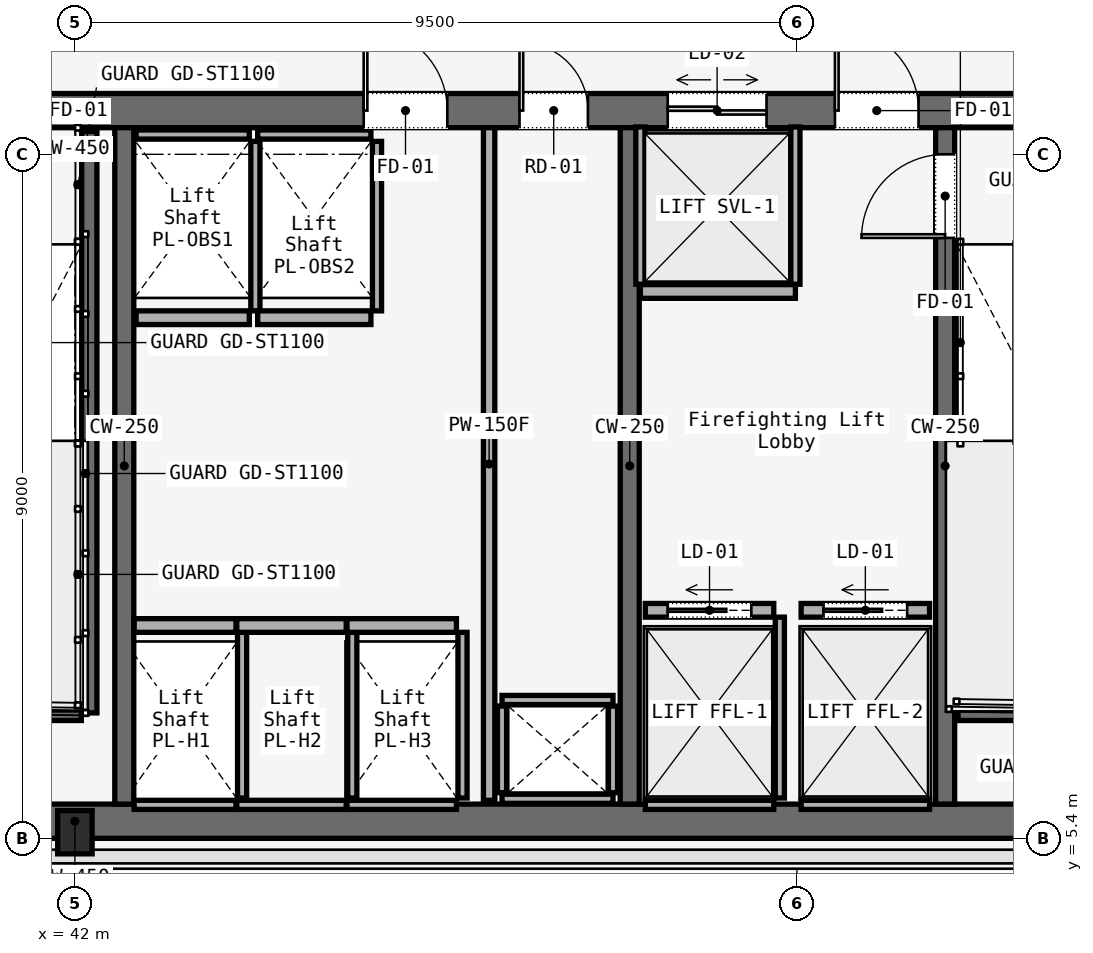
"""IFC4 building model, lengths in metres.
Left out: names, types, materials, properties, quantities, classifications, styles, units other than length and angle.
Written with IfcOpenShell. Run it as: python <this file> out.ifc"""

import sys

from ifc_helpers import new_model, si_unit, direction, frame, frame_2d, origin, origin_2d, place, context, subcontext, project, spatial, rectangle, i_section, extrude, element, fill, save


model = new_model("IFC4")
c1 = context("Model", 3, precision=1e-05, world=origin(), true_north=direction((0.0, 1.0)))
c2 = subcontext(c1, "Body", "Model", "MODEL_VIEW")
j1 = project(units=[si_unit("LENGTHUNIT", "METRE"), si_unit("PLANEANGLEUNIT", "RADIAN")], contexts=[c1])
p1 = place(None, origin())
s1 = spatial("IfcSite", under=j1, at=p1, CompositionType="ELEMENT")
p2 = place(p1, origin())
s2 = spatial("IfcBuilding", under=s1, at=p2, CompositionType="ELEMENT")
p3 = place(p2, frame((0.0, 0.0, 62.6)))
s3 = spatial("IfcBuildingStorey", under=s2, at=p3, CompositionType="ELEMENT", Elevation=62.6)
p4 = place(p3, frame((26.45, 14.975, 0.0), z_axis=(0.0, 0.0, 1.0), x_axis=(1.0, 0.0, 0.0)))
e1 = element("IfcWall", 1, at=p4, inside=s3, PredefinedType="SOLIDWALL", context=c2, shape_type="SweptSolid", body=[
    extrude(rectangle(XDim=31.1, YDim=0.45, at=frame_2d((15.55, 0.0))), origin(), (0.0, 0.0, 1.0), 3.58),
])
p5 = place(p4, frame((1.65, 0.0, 0.0)))
e2 = element("IfcOpeningElement", 2, at=p5, cuts=e1, PredefinedType="OPENING", context=c2, shape_type="SweptSolid", body=[
    extrude(rectangle(XDim=1.1, YDim=2.2, at=frame_2d((0.55, 1.1))), frame((0.0, 0.225, 0.0), z_axis=(0.0, -1.0, 0.0), x_axis=(1.0, 0.0, 0.0)), (0.0, 0.0, 1.0), 0.45),
])
p6 = place(p4, frame((13.65, 0.0, 0.0)))
e3 = element("IfcOpeningElement", 3, at=p6, cuts=e1, PredefinedType="OPENING", context=c2, shape_type="SweptSolid", body=[
    extrude(rectangle(XDim=1.1, YDim=2.2, at=frame_2d((0.55, 1.1))), frame((0.0, 0.225, 0.0), z_axis=(0.0, -1.0, 0.0), x_axis=(1.0, 0.0, 0.0)), (0.0, 0.0, 1.0), 0.45),
])
p7 = place(p4, frame((25.55, 0.0, 0.0)))
e4 = element("IfcOpeningElement", 4, at=p7, cuts=e1, PredefinedType="OPENING", context=c2, shape_type="SweptSolid", body=[
    extrude(rectangle(XDim=1.1, YDim=2.2, at=frame_2d((0.55, 1.1))), frame((0.0, 0.225, 0.0), z_axis=(0.0, -1.0, 0.0), x_axis=(1.0, 0.0, 0.0)), (0.0, 0.0, 1.0), 0.45),
])
p8 = place(p4, frame((10.7, 0.0, 0.0)))
e5 = element("IfcOpeningElement", 5, at=p8, cuts=e1, PredefinedType="OPENING", context=c2, shape_type="SweptSolid", body=[
    extrude(rectangle(XDim=1.4, YDim=2.2, at=frame_2d((0.7, 1.1))), frame((0.0, 0.225, 0.0), z_axis=(0.0, -1.0, 0.0), x_axis=(1.0, 0.0, 0.0)), (0.0, 0.0, 1.0), 0.45),
])
p9 = place(p4, frame((19.35, 0.0, 0.0)))
e6 = element("IfcOpeningElement", 6, at=p9, cuts=e1, PredefinedType="OPENING", context=c2, shape_type="SweptSolid", body=[
    extrude(rectangle(XDim=1.1, YDim=2.2, at=frame_2d((0.55, 1.1))), frame((0.0, 0.225, 0.0), z_axis=(0.0, -1.0, 0.0), x_axis=(1.0, 0.0, 0.0)), (0.0, 0.0, 1.0), 0.45),
])
p10 = place(p4, frame((21.4, 0.0, 0.0)))
e7 = element("IfcOpeningElement", 7, at=p10, cuts=e1, PredefinedType="OPENING", context=c2, shape_type="SweptSolid", body=[
    extrude(rectangle(XDim=0.9, YDim=2.1, at=frame_2d((0.45, 1.05))), frame((0.0, 0.225, 0.0), z_axis=(0.0, -1.0, 0.0), x_axis=(1.0, 0.0, 0.0)), (0.0, 0.0, 1.0), 0.45),
])
p11 = place(p4, frame((23.35, 0.0, 0.0)))
e8 = element("IfcOpeningElement", 8, at=p11, cuts=e1, PredefinedType="OPENING", context=c2, shape_type="SweptSolid", body=[
    extrude(rectangle(XDim=1.3, YDim=2.3, at=frame_2d((0.65, 1.15))), frame((0.0, 0.225, 0.0), z_axis=(0.0, -1.0, 0.0), x_axis=(1.0, 0.0, 0.0)), (0.0, 0.0, 1.0), 0.45),
])
p12 = place(p3, frame((26.45, 5.625, 0.0), z_axis=(0.0, 0.0, 1.0), x_axis=(1.0, 0.0, 0.0)))
e9 = element("IfcWall", 9, at=p12, inside=s3, PredefinedType="SOLIDWALL", context=c2, shape_type="SweptSolid", body=[
    extrude(rectangle(XDim=31.1, YDim=0.45, at=frame_2d((15.55, 0.0))), origin(), (0.0, 0.0, 1.0), 3.58),
])
for number, where, z_axis, x_axis in (
    (10, (42.65, 5.85, 0.0), (0.0, 0.0, 1.0), (0.0, 1.0, 0.0)),
    (11, (49.3, 5.85, 0.0), (0.0, 0.0, 1.0), (0.0, 1.0, 0.0)),
):
    element("IfcWall", number, at=place(p3, frame(where, z_axis=z_axis, x_axis=x_axis)), inside=s3, PredefinedType="SOLIDWALL", context=c2, shape_type="SweptSolid", body=[
        extrude(rectangle(XDim=8.9, YDim=0.25, at=frame_2d((4.45, 0.0))), origin(), (0.0, 0.0, 1.0), 3.58),
    ])
p13 = place(p3, frame((53.45, 5.85, 0.0), z_axis=(0.0, 0.0, 1.0), x_axis=(0.0, 1.0, 0.0)))
e12 = element("IfcWall", 12, at=p13, inside=s3, PredefinedType="SOLIDWALL", context=c2, shape_type="SweptSolid", body=[
    extrude(rectangle(XDim=8.9, YDim=0.25, at=frame_2d((4.45, 0.0))), origin(), (0.0, 0.0, 1.0), 3.58),
])
p14 = place(p13, frame((7.45, 0.0, 0.0)))
e13 = element("IfcOpeningElement", 13, at=p14, cuts=e12, PredefinedType="OPENING", context=c2, shape_type="SweptSolid", body=[
    extrude(rectangle(XDim=1.1, YDim=2.2, at=frame_2d((0.55, 1.1))), frame((0.0, 0.125, 0.0), z_axis=(0.0, -1.0, 0.0), x_axis=(1.0, 0.0, 0.0)), (0.0, 0.0, 1.0), 0.25),
])
p15 = place(p3, frame((42.0, 5.48, 0.0), z_axis=(0.0, 0.0, 1.0), x_axis=(1.0, 0.0, 0.0)))
e14 = element("IfcColumn", 14, at=p15, inside=s3, PredefinedType="COLUMN", context=c2, shape_type="SweptSolid", body=[
    extrude(i_section(OverallWidth=0.454, OverallDepth=0.569, WebThickness=0.078, FlangeThickness=0.08, FilletRadius=0.015, at=origin_2d()), origin(), (0.0, 0.0, 1.0), 3.58),
])
p16 = place(p3, frame((42.19, 14.7, 0.0), z_axis=(0.0, 0.0, 1.0), x_axis=(0.0, -1.0, 0.0)))
e15 = element("IfcWall", 15, at=p16, inside=s3, PredefinedType="SOLIDWALL", context=c2, shape_type="SweptSolid", body=[
    extrude(rectangle(XDim=7.65, YDim=0.2, at=frame_2d((3.825, 0.0))), origin(), (0.0, 0.0, 1.0), 3.8),
])
for number, where, z_axis, x_axis in (
    (16, (38.97, 7.05, 0.0), (0.0, 0.0, 1.0), (1.0, 0.0, 0.0)),
    (17, (53.62, 7.05, 0.0), (0.0, 0.0, 1.0), (1.0, 0.0, 0.0)),
):
    element("IfcWall", number, at=place(p3, frame(where, z_axis=z_axis, x_axis=x_axis)), inside=s3, PredefinedType="SOLIDWALL", context=c2, shape_type="SweptSolid", body=[
        extrude(rectangle(XDim=3.115, YDim=0.2, at=frame_2d((1.558, 0.0))), origin(), (0.0, 0.0, 1.0), 3.8),
    ])
for number, where, z_axis, x_axis in (
    (18, (47.62, 5.92, 0.0), (0.0, 0.0, 1.0), (1.0, 0.0, 0.0)),
    (19, (47.62, 7.22, 0.0), (0.0, 0.0, 1.0), (1.0, 0.0, 0.0)),
):
    element("IfcWall", number, at=place(p3, frame(where, z_axis=z_axis, x_axis=x_axis)), inside=s3, PredefinedType="SOLIDWALL", context=c2, shape_type="SweptSolid", body=[
        extrude(rectangle(XDim=1.46, YDim=0.12, at=frame_2d((0.73, 0.0))), origin(), (0.0, 0.0, 1.0), 2.933),
    ])
for number, where, z_axis, x_axis in (
    (20, (47.62, 6.0, 0.0), (0.0, 0.0, 1.0), (0.0, 1.0, 0.0)),
    (21, (49.08, 6.0, 0.0), (0.0, 0.0, 1.0), (0.0, 1.0, 0.0)),
):
    element("IfcWall", number, at=place(p3, frame(where, z_axis=z_axis, x_axis=x_axis)), inside=s3, PredefinedType="SOLIDWALL", context=c2, shape_type="SweptSolid", body=[
        extrude(rectangle(XDim=1.14, YDim=0.12, at=frame_2d((0.57, 0.0))), origin(), (0.0, 0.0, 1.0), 2.933),
    ])
p17 = place(p3, frame((47.45, 5.9, 0.0), z_axis=(0.0, 0.0, 1.0), x_axis=(0.0, 1.0, 0.0)))
e22 = element("IfcWall", 22, at=p17, inside=s3, PredefinedType="PARTITIONING", context=c2, shape_type="SweptSolid", body=[
    extrude(rectangle(XDim=8.85, YDim=0.15, at=frame_2d((4.425, 0.0))), origin(), (0.0, 0.0, 1.0), 2.933),
])
p18 = place(p3, frame((42.78, 8.2, 0.0), z_axis=(0.0, 0.0, 1.0), x_axis=(1.0, 0.0, 0.0)))
e23 = element("IfcWall", 23, at=p18, inside=s3, PredefinedType="SOLIDWALL", context=c2, shape_type="SweptSolid", body=[
    extrude(rectangle(XDim=1.34, YDim=0.18, at=frame_2d((0.67, 0.0))), origin(), (0.0, 0.0, 1.0), 2.933),
])
p19 = place(p3, frame((42.78, 5.84, 0.0), z_axis=(0.0, 0.0, 1.0), x_axis=(1.0, 0.0, 0.0)))
e24 = element("IfcWall", 24, at=p19, inside=s3, PredefinedType="SOLIDWALL", context=c2, shape_type="SweptSolid", body=[
    extrude(rectangle(XDim=1.34, YDim=0.12, at=frame_2d((0.67, 0.0))), origin(), (0.0, 0.0, 1.0), 2.933),
])
p20 = place(p3, frame((44.2, 5.93, 0.0), z_axis=(0.0, 0.0, 1.0), x_axis=(0.0, 1.0, 0.0)))
e25 = element("IfcWall", 25, at=p20, inside=s3, PredefinedType="SOLIDWALL", context=c2, shape_type="SweptSolid", body=[
    extrude(rectangle(XDim=2.18, YDim=0.12, at=frame_2d((1.09, 0.0))), origin(), (0.0, 0.0, 1.0), 2.933),
])
p21 = place(p3, frame((44.13, 8.2, 0.0), z_axis=(0.0, 0.0, 1.0), x_axis=(1.0, 0.0, 0.0)))
e26 = element("IfcWall", 26, at=p21, inside=s3, PredefinedType="SOLIDWALL", context=c2, shape_type="SweptSolid", body=[
    extrude(rectangle(XDim=1.44, YDim=0.18, at=frame_2d((0.72, 0.0))), origin(), (0.0, 0.0, 1.0), 2.933),
])
p22 = place(p3, frame((44.13, 5.84, 0.0), z_axis=(0.0, 0.0, 1.0), x_axis=(1.0, 0.0, 0.0)))
e27 = element("IfcWall", 27, at=p22, inside=s3, PredefinedType="SOLIDWALL", context=c2, shape_type="SweptSolid", body=[
    extrude(rectangle(XDim=1.44, YDim=0.12, at=frame_2d((0.72, 0.0))), origin(), (0.0, 0.0, 1.0), 2.933),
])
p23 = place(p3, frame((45.65, 5.93, 0.0), z_axis=(0.0, 0.0, 1.0), x_axis=(0.0, 1.0, 0.0)))
e28 = element("IfcWall", 28, at=p23, inside=s3, PredefinedType="SOLIDWALL", context=c2, shape_type="SweptSolid", body=[
    extrude(rectangle(XDim=2.18, YDim=0.12, at=frame_2d((1.09, 0.0))), origin(), (0.0, 0.0, 1.0), 2.933),
])
p24 = place(p3, frame((45.58, 8.2, 0.0), z_axis=(0.0, 0.0, 1.0), x_axis=(1.0, 0.0, 0.0)))
e29 = element("IfcWall", 29, at=p24, inside=s3, PredefinedType="SOLIDWALL", context=c2, shape_type="SweptSolid", body=[
    extrude(rectangle(XDim=1.44, YDim=0.18, at=frame_2d((0.72, 0.0))), origin(), (0.0, 0.0, 1.0), 2.933),
])
p25 = place(p3, frame((45.58, 5.84, 0.0), z_axis=(0.0, 0.0, 1.0), x_axis=(1.0, 0.0, 0.0)))
e30 = element("IfcWall", 30, at=p25, inside=s3, PredefinedType="SOLIDWALL", context=c2, shape_type="SweptSolid", body=[
    extrude(rectangle(XDim=1.44, YDim=0.12, at=frame_2d((0.72, 0.0))), origin(), (0.0, 0.0, 1.0), 2.933),
])
p26 = place(p3, frame((47.1, 5.93, 0.0), z_axis=(0.0, 0.0, 1.0), x_axis=(0.0, 1.0, 0.0)))
e31 = element("IfcWall", 31, at=p26, inside=s3, PredefinedType="SOLIDWALL", context=c2, shape_type="SweptSolid", body=[
    extrude(rectangle(XDim=2.18, YDim=0.12, at=frame_2d((1.09, 0.0))), origin(), (0.0, 0.0, 1.0), 2.933),
])
p27 = place(p3, frame((42.805, 12.25, 0.0), z_axis=(0.0, 0.0, 1.0), x_axis=(1.0, 0.0, 0.0)))
e32 = element("IfcWall", 32, at=p27, inside=s3, PredefinedType="SOLIDWALL", context=c2, shape_type="SweptSolid", body=[
    extrude(rectangle(XDim=1.49, YDim=0.18, at=frame_2d((0.745, 0.0))), origin(), (0.0, 0.0, 1.0), 2.933),
])
p28 = place(p3, frame((42.805, 14.66, 0.0), z_axis=(0.0, 0.0, 1.0), x_axis=(1.0, 0.0, 0.0)))
e33 = element("IfcWall", 33, at=p28, inside=s3, PredefinedType="SOLIDWALL", context=c2, shape_type="SweptSolid", body=[
    extrude(rectangle(XDim=1.49, YDim=0.12, at=frame_2d((0.745, 0.0))), origin(), (0.0, 0.0, 1.0), 2.933),
])
p29 = place(p3, frame((44.375, 12.34, 0.0), z_axis=(0.0, 0.0, 1.0), x_axis=(0.0, 1.0, 0.0)))
e34 = element("IfcWall", 34, at=p29, inside=s3, PredefinedType="SOLIDWALL", context=c2, shape_type="SweptSolid", body=[
    extrude(rectangle(XDim=2.23, YDim=0.12, at=frame_2d((1.115, 0.0))), origin(), (0.0, 0.0, 1.0), 2.933),
])
p30 = place(p3, frame((44.405, 12.25, 0.0), z_axis=(0.0, 0.0, 1.0), x_axis=(1.0, 0.0, 0.0)))
e35 = element("IfcWall", 35, at=p30, inside=s3, PredefinedType="SOLIDWALL", context=c2, shape_type="SweptSolid", body=[
    extrude(rectangle(XDim=1.49, YDim=0.18, at=frame_2d((0.745, 0.0))), origin(), (0.0, 0.0, 1.0), 2.933),
])
p31 = place(p3, frame((44.405, 14.66, 0.0), z_axis=(0.0, 0.0, 1.0), x_axis=(1.0, 0.0, 0.0)))
e36 = element("IfcWall", 36, at=p31, inside=s3, PredefinedType="SOLIDWALL", context=c2, shape_type="SweptSolid", body=[
    extrude(rectangle(XDim=1.49, YDim=0.12, at=frame_2d((0.745, 0.0))), origin(), (0.0, 0.0, 1.0), 2.933),
])
p32 = place(p3, frame((45.975, 12.34, 0.0), z_axis=(0.0, 0.0, 1.0), x_axis=(0.0, 1.0, 0.0)))
e37 = element("IfcWall", 37, at=p32, inside=s3, PredefinedType="SOLIDWALL", context=c2, shape_type="SweptSolid", body=[
    extrude(rectangle(XDim=2.23, YDim=0.12, at=frame_2d((1.115, 0.0))), origin(), (0.0, 0.0, 1.0), 2.933),
])
p33 = place(p3, frame((49.505, 8.4, 0.0), z_axis=(0.0, 0.0, 1.0), x_axis=(1.0, 0.0, 0.0)))
e38 = element("IfcWall", 38, at=p33, inside=s3, PredefinedType="SOLIDWALL", context=c2, shape_type="SweptSolid", body=[
    extrude(rectangle(XDim=1.69, YDim=0.18, at=frame_2d((0.845, 0.0))), origin(), (0.0, 0.0, 1.0), 2.933),
])
p34 = place(p33, frame((0.295, 0.0, 0.0)))
e39 = element("IfcOpeningElement", 39, at=p34, cuts=e38, PredefinedType="OPENING", context=c2, shape_type="SweptSolid", body=[
    extrude(rectangle(XDim=1.1, YDim=2.2, at=frame_2d((0.55, 1.1))), frame((0.0, 0.09, 0.0), z_axis=(0.0, -1.0, 0.0), x_axis=(1.0, 0.0, 0.0)), (0.0, 0.0, 1.0), 0.18),
])
p35 = place(p3, frame((49.505, 5.84, 0.0), z_axis=(0.0, 0.0, 1.0), x_axis=(1.0, 0.0, 0.0)))
e40 = element("IfcWall", 40, at=p35, inside=s3, PredefinedType="SOLIDWALL", context=c2, shape_type="SweptSolid", body=[
    extrude(rectangle(XDim=1.69, YDim=0.12, at=frame_2d((0.845, 0.0))), origin(), (0.0, 0.0, 1.0), 2.933),
])
p36 = place(p3, frame((51.275, 5.93, 0.0), z_axis=(0.0, 0.0, 1.0), x_axis=(0.0, 1.0, 0.0)))
e41 = element("IfcWall", 41, at=p36, inside=s3, PredefinedType="SOLIDWALL", context=c2, shape_type="SweptSolid", body=[
    extrude(rectangle(XDim=2.38, YDim=0.12, at=frame_2d((1.19, 0.0))), origin(), (0.0, 0.0, 1.0), 2.933),
])
p37 = place(p3, frame((51.555, 8.4, 0.0), z_axis=(0.0, 0.0, 1.0), x_axis=(1.0, 0.0, 0.0)))
e42 = element("IfcWall", 42, at=p37, inside=s3, PredefinedType="SOLIDWALL", context=c2, shape_type="SweptSolid", body=[
    extrude(rectangle(XDim=1.69, YDim=0.18, at=frame_2d((0.845, 0.0))), origin(), (0.0, 0.0, 1.0), 2.933),
])
p38 = place(p37, frame((0.295, 0.0, 0.0)))
e43 = element("IfcOpeningElement", 43, at=p38, cuts=e42, PredefinedType="OPENING", context=c2, shape_type="SweptSolid", body=[
    extrude(rectangle(XDim=1.1, YDim=2.2, at=frame_2d((0.55, 1.1))), frame((0.0, 0.09, 0.0), z_axis=(0.0, -1.0, 0.0), x_axis=(1.0, 0.0, 0.0)), (0.0, 0.0, 1.0), 0.18),
])
p39 = place(p3, frame((51.555, 5.84, 0.0), z_axis=(0.0, 0.0, 1.0), x_axis=(1.0, 0.0, 0.0)))
e44 = element("IfcWall", 44, at=p39, inside=s3, PredefinedType="SOLIDWALL", context=c2, shape_type="SweptSolid", body=[
    extrude(rectangle(XDim=1.69, YDim=0.12, at=frame_2d((0.845, 0.0))), origin(), (0.0, 0.0, 1.0), 2.933),
])
p40 = place(p3, frame((49.44, 12.595, 0.0), z_axis=(0.0, 0.0, 1.0), x_axis=(1.0, 0.0, 0.0)))
e45 = element("IfcWall", 45, at=p40, inside=s3, PredefinedType="SOLIDWALL", context=c2, shape_type="SweptSolid", body=[
    extrude(rectangle(XDim=2.04, YDim=0.18, at=frame_2d((1.02, 0.0))), origin(), (0.0, 0.0, 1.0), 2.933),
])
for number, where, z_axis, x_axis in (
    (46, (49.44, 12.69, 0.0), (0.0, 0.0, 1.0), (0.0, 1.0, 0.0)),
    (47, (51.48, 12.69, 0.0), (0.0, 0.0, 1.0), (0.0, 1.0, 0.0)),
):
    element("IfcWall", number, at=place(p3, frame(where, z_axis=z_axis, x_axis=x_axis)), inside=s3, PredefinedType="SOLIDWALL", context=c2, shape_type="SweptSolid", body=[
        extrude(rectangle(XDim=2.07, YDim=0.12, at=frame_2d((1.035, 0.0))), origin(), (0.0, 0.0, 1.0), 2.933),
    ])
p41 = place(p7, origin())
e48 = element("IfcDoor", 48, at=p41, inside=s3, OperationType="SINGLE_SWING_RIGHT", PredefinedType="DOOR", context=c2, shape_type="SweptSolid", body=[
    extrude(rectangle(XDim=1.1, YDim=2.2, at=frame_2d((0.55, 1.1))), frame((0.0, 0.025, 0.0), z_axis=(0.0, -1.0, 0.0), x_axis=(1.0, 0.0, 0.0)), (0.0, 0.0, 1.0), 0.05),
])
fill(e4, e48)
p42 = place(p9, origin())
e49 = element("IfcDoor", 49, at=p42, inside=s3, OperationType="SINGLE_SWING_LEFT", PredefinedType="DOOR", context=c2, shape_type="SweptSolid", body=[
    extrude(rectangle(XDim=1.1, YDim=2.2, at=frame_2d((0.55, 1.1))), frame((0.0, 0.025, 0.0), z_axis=(0.0, -1.0, 0.0), x_axis=(1.0, 0.0, 0.0)), (0.0, 0.0, 1.0), 0.05),
])
fill(e6, e49)
p43 = place(p10, origin())
e50 = element("IfcDoor", 50, at=p43, inside=s3, OperationType="SINGLE_SWING_LEFT", PredefinedType="DOOR", context=c2, shape_type="SweptSolid", body=[
    extrude(rectangle(XDim=0.9, YDim=2.1, at=frame_2d((0.45, 1.05))), frame((0.0, 0.025, 0.0), z_axis=(0.0, -1.0, 0.0), x_axis=(1.0, 0.0, 0.0)), (0.0, 0.0, 1.0), 0.05),
])
fill(e7, e50)
p44 = place(p14, origin())
e51 = element("IfcDoor", 51, at=p44, inside=s3, OperationType="SINGLE_SWING_LEFT", PredefinedType="DOOR", context=c2, shape_type="SweptSolid", body=[
    extrude(rectangle(XDim=1.1, YDim=2.2, at=frame_2d((0.55, 1.1))), frame((0.0, 0.025, 0.0), z_axis=(0.0, -1.0, 0.0), x_axis=(1.0, 0.0, 0.0)), (0.0, 0.0, 1.0), 0.05),
])
fill(e13, e51)
p45 = place(p34, origin())
e52 = element("IfcDoor", 52, at=p45, inside=s3, OperationType="SLIDING_TO_LEFT", PredefinedType="DOOR", context=c2, shape_type="SweptSolid", body=[
    extrude(rectangle(XDim=1.1, YDim=2.2, at=frame_2d((0.55, 1.1))), frame((0.0, 0.025, 0.0), z_axis=(0.0, -1.0, 0.0), x_axis=(1.0, 0.0, 0.0)), (0.0, 0.0, 1.0), 0.05),
])
fill(e39, e52)
p46 = place(p38, origin())
e53 = element("IfcDoor", 53, at=p46, inside=s3, OperationType="SLIDING_TO_LEFT", PredefinedType="DOOR", context=c2, shape_type="SweptSolid", body=[
    extrude(rectangle(XDim=1.1, YDim=2.2, at=frame_2d((0.55, 1.1))), frame((0.0, 0.025, 0.0), z_axis=(0.0, -1.0, 0.0), x_axis=(1.0, 0.0, 0.0)), (0.0, 0.0, 1.0), 0.05),
])
fill(e43, e53)
p47 = place(p11, origin())
e54 = element("IfcDoor", 54, at=p47, inside=s3, OperationType="DOUBLE_DOOR_SLIDING", PredefinedType="DOOR", context=c2, shape_type="SweptSolid", body=[
    extrude(rectangle(XDim=1.3, YDim=2.3, at=frame_2d((0.65, 1.15))), frame((0.0, 0.025, 0.0), z_axis=(0.0, -1.0, 0.0), x_axis=(1.0, 0.0, 0.0)), (0.0, 0.0, 1.0), 0.05),
])
fill(e8, e54)
save(model, sys.argv[1])
